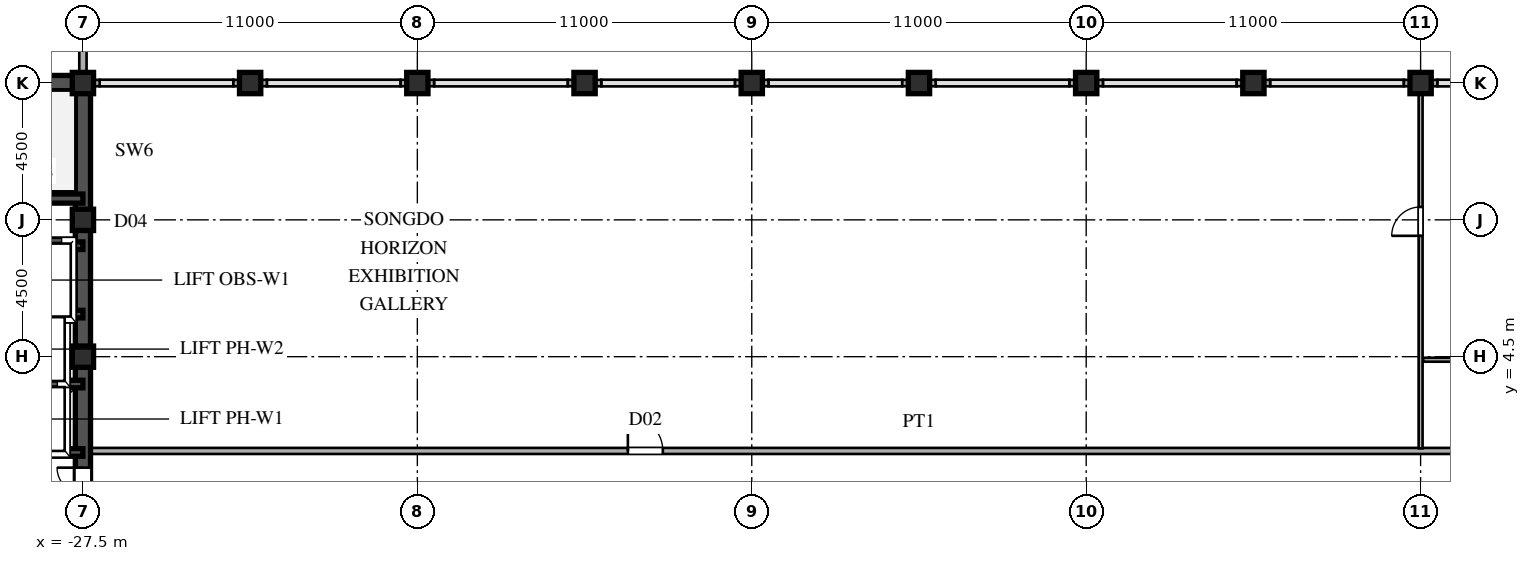
"""IFC4 building model, lengths in metres.
Left out: names, types, materials, properties, quantities, classifications, styles, units other than length and angle.
Written with IfcOpenShell. Run it as: python <this file> out.ifc"""

import sys

from ifc_helpers import new_model, si_unit, direction, frame, frame_2d, origin, origin_2d, place, context, subcontext, project, spatial, rectangle, hollow_rectangle, extrude, source, transform, mapped, element, fill, save


model = new_model("IFC4")
c1 = context("Model", 3, precision=1e-05, world=origin(), true_north=direction((0.0, 1.0)))
c2 = subcontext(c1, "Body", "Model", "MODEL_VIEW")
j1 = project(units=[si_unit("LENGTHUNIT", "METRE"), si_unit("PLANEANGLEUNIT", "RADIAN")], contexts=[c1])
p1 = place(None, origin())
s1 = spatial("IfcSite", under=j1, at=p1, CompositionType="ELEMENT")
p2 = place(p1, origin())
s2 = spatial("IfcBuilding", under=s1, at=p2, CompositionType="ELEMENT")
p3 = place(p2, frame((0.0, 0.0, 269.4)))
s3 = spatial("IfcBuildingStorey", under=s2, at=p3, CompositionType="ELEMENT", Elevation=269.4)
m1 = source(origin(), c2, "Body", "SweptSolid", [
    extrude(hollow_rectangle(XDim=0.7, YDim=0.7, WallThickness=0.03, at=origin_2d()), origin(), (0.0, 0.0, 1.0), 4.8),
])
for number, where, z_axis, x_axis in (
    (1, (-27.5, 4.5, 0.0), (0.0, 0.0, 1.0), (1.0, 0.0, 0.0)),
    (2, (-27.5, 9.0, 0.0), (0.0, 0.0, 1.0), (1.0, 0.0, 0.0)),
    (3, (-27.5, 13.5, 0.0), (0.0, 0.0, 1.0), (1.0, 0.0, 0.0)),
    (4, (-22.0, 13.5, 0.0), (0.0, 0.0, 1.0), (1.0, 0.0, 0.0)),
    (5, (-16.5, 13.5, 0.0), (0.0, 0.0, 1.0), (1.0, 0.0, 0.0)),
    (6, (-11.0, 13.5, 0.0), (0.0, 0.0, 1.0), (1.0, 0.0, 0.0)),
    (7, (-5.5, 13.5, 0.0), (0.0, 0.0, 1.0), (1.0, 0.0, 0.0)),
    (8, (0.0, 13.5, 0.0), (0.0, 0.0, 1.0), (1.0, 0.0, 0.0)),
    (9, (5.5, 13.5, 0.0), (0.0, 0.0, 1.0), (1.0, 0.0, 0.0)),
    (10, (11.0, 13.5, 0.0), (0.0, 0.0, 1.0), (1.0, 0.0, 0.0)),
    (11, (16.5, 13.5, 0.0), (0.0, 0.0, 1.0), (1.0, 0.0, 0.0)),
):
    element("IfcColumn", number, at=place(p3, frame(where, z_axis=z_axis, x_axis=x_axis)), inside=s3, PredefinedType="COLUMN", context=c2, shape_type="MappedRepresentation", body=[
        mapped(m1, transform((0.0, 0.0, 0.0), scale=1.0)),
    ])
p4 = place(p3, frame((-27.5, 13.755, 0.0), z_axis=(0.0, 0.0, 1.0), x_axis=(0.0, 1.0, 0.0)))
e12 = element("IfcWall", 12, at=p4, inside=s3, PredefinedType="SOLIDWALL", context=c2, shape_type="SweptSolid", body=[
    extrude(rectangle(XDim=0.62, YDim=0.24, at=frame_2d((0.31, 0.0))), origin(), (0.0, 0.0, 1.0), 4.04),
])
p5 = place(p3, frame((-27.5, 14.375, 0.0), z_axis=(0.0, 0.0, 1.0), x_axis=(0.0, 1.0, 0.0)))
e13 = element("IfcWall", 13, at=p5, inside=s3, PredefinedType="SOLIDWALL", context=c2, shape_type="SweptSolid", body=[
    extrude(rectangle(XDim=1.605, YDim=0.24, at=frame_2d((0.803, 0.0))), origin(), (0.0, 0.0, 1.0), 4.54),
])
p6 = place(p3, frame((-27.49, 13.5, 0.0), z_axis=(0.0, 0.0, 1.0), x_axis=(1.0, 0.0, 0.0)))
e14 = element("IfcWall", 14, at=p6, inside=s3, PredefinedType="SOLIDWALL", context=c2, shape_type="SweptSolid", body=[
    extrude(rectangle(XDim=0.54, YDim=0.21, at=frame_2d((0.27, 0.0))), origin(), (0.0, 0.0, 1.0), 4.04),
])
for number, where, z_axis, x_axis in (
    (15, (-22.55, 13.5, 0.0), (0.0, 0.0, 1.0), (1.0, 0.0, 0.0)),
    (16, (-17.05, 13.5, 0.0), (0.0, 0.0, 1.0), (1.0, 0.0, 0.0)),
    (17, (-11.55, 13.5, 0.0), (0.0, 0.0, 1.0), (1.0, 0.0, 0.0)),
    (18, (-6.05, 13.5, 0.0), (0.0, 0.0, 1.0), (1.0, 0.0, 0.0)),
    (19, (-0.55, 13.5, 0.0), (0.0, 0.0, 1.0), (1.0, 0.0, 0.0)),
    (20, (4.95, 13.5, 0.0), (0.0, 0.0, 1.0), (1.0, 0.0, 0.0)),
    (21, (10.45, 13.5, 0.0), (0.0, 0.0, 1.0), (1.0, 0.0, 0.0)),
    (22, (15.95, 13.5, 0.0), (0.0, 0.0, 1.0), (1.0, 0.0, 0.0)),
):
    element("IfcWall", number, at=place(p3, frame(where, z_axis=z_axis, x_axis=x_axis)), inside=s3, PredefinedType="SOLIDWALL", context=c2, shape_type="SweptSolid", body=[
        extrude(rectangle(XDim=1.1, YDim=0.21, at=frame_2d((0.55, 0.0))), origin(), (0.0, 0.0, 1.0), 4.04),
    ])
p7 = place(p3, frame((-27.5, 1.3, 0.0), z_axis=(0.0, 0.0, 1.0), x_axis=(0.0, 1.0, 0.0)))
e23 = element("IfcWall", 23, at=p7, inside=s3, PredefinedType="SHEAR", context=c2, shape_type="SweptSolid", body=[
    extrude(rectangle(XDim=12.2, YDim=0.5, at=frame_2d((6.1, 0.0))), origin(), (0.0, 0.0, 1.0), 4.54),
])
p8 = place(p3, frame((-27.5, -1.3, 0.0), z_axis=(0.0, 0.0, 1.0), x_axis=(0.0, 1.0, 0.0)))
e24 = element("IfcWall", 24, at=p8, inside=s3, PredefinedType="SHEAR", context=c2, shape_type="SweptSolid", body=[
    extrude(rectangle(XDim=2.6, YDim=0.5, at=frame_2d((1.3, 0.0))), origin(), (0.0, 0.0, 1.0), 4.54),
])
p9 = place(p8, frame((0.45, 0.0, 0.0)))
e25 = element("IfcOpeningElement", 25, at=p9, cuts=e24, PredefinedType="OPENING", context=c2, shape_type="SweptSolid", body=[
    extrude(rectangle(XDim=1.7, YDim=2.35, at=frame_2d((0.85, 1.175))), frame((0.0, 0.26, 0.0), z_axis=(0.0, -1.0, 0.0), x_axis=(1.0, 0.0, 0.0)), (0.0, 0.0, 1.0), 0.52),
])
p10 = place(p3, frame((-36.5, 13.5, 0.0), z_axis=(0.0, 0.0, 1.0), x_axis=(1.0, 0.0, 0.0)))
e26 = element("IfcWall", 26, at=p10, inside=s3, PredefinedType="SHEAR", context=c2, shape_type="SweptSolid", body=[
    extrude(rectangle(XDim=9.0, YDim=0.5, at=frame_2d((4.5, 0.0))), origin(), (0.0, 0.0, 1.0), 4.54),
])
p11 = place(p3, frame((-36.5, 9.7, 0.0), z_axis=(0.0, 0.0, 1.0), x_axis=(1.0, 0.0, 0.0)))
e27 = element("IfcWall", 27, at=p11, inside=s3, PredefinedType="SHEAR", context=c2, shape_type="SweptSolid", body=[
    extrude(rectangle(XDim=9.0, YDim=0.3, at=frame_2d((4.5, 0.0))), origin(), (0.0, 0.0, 1.0), 4.54),
])
p12 = place(p11, frame((0.6, 0.0, 0.0)))
e28 = element("IfcOpeningElement", 28, at=p12, cuts=e27, PredefinedType="OPENING", context=c2, shape_type="SweptSolid", body=[
    extrude(rectangle(XDim=1.1, YDim=2.2, at=frame_2d((0.55, 1.1))), frame((0.0, 0.16, 0.0), z_axis=(0.0, -1.0, 0.0), x_axis=(1.0, 0.0, 0.0)), (0.0, 0.0, 1.0), 0.32),
])
for number, where, z_axis, x_axis in (
    (29, (-30.3, 1.35, 0.0), (0.0, 0.0, 1.0), (1.0, 0.0, 0.0)),
    (30, (-30.3, 3.6, 0.0), (0.0, 0.0, 1.0), (1.0, 0.0, 0.0)),
    (31, (-30.3, 5.9, 0.0), (0.0, 0.0, 1.0), (1.0, 0.0, 0.0)),
    (32, (-30.3, 8.15, 0.0), (0.0, 0.0, 1.0), (1.0, 0.0, 0.0)),
):
    element("IfcWall", number, at=place(p3, frame(where, z_axis=z_axis, x_axis=x_axis)), inside=s3, PredefinedType="SHEAR", context=c2, shape_type="SweptSolid", body=[
        extrude(rectangle(XDim=2.8, YDim=0.25, at=frame_2d((1.4, 0.0))), origin(), (0.0, 0.0, 1.0), 4.54),
    ])
p13 = place(p3, frame((-27.245, 1.4, 0.0), z_axis=(0.0, 0.0, 1.0), x_axis=(1.0, 0.0, 0.0)))
e33 = element("IfcWall", 33, at=p13, inside=s3, PredefinedType="PARTITIONING", context=c2, shape_type="SweptSolid", body=[
    extrude(rectangle(XDim=54.49, YDim=0.2, at=frame_2d((27.245, 0.0))), origin(), (0.0, 0.0, 1.0), 4.54),
])
p14 = place(p13, frame((17.67, 0.0, 0.0)))
e34 = element("IfcOpeningElement", 34, at=p14, cuts=e33, PredefinedType="OPENING", context=c2, shape_type="SweptSolid", body=[
    extrude(rectangle(XDim=1.15, YDim=2.2, at=frame_2d((0.575, 1.1))), frame((0.0, 0.11, 0.0), z_axis=(0.0, -1.0, 0.0), x_axis=(1.0, 0.0, 0.0)), (0.0, 0.0, 1.0), 0.22),
])
p15 = place(p13, frame((46.055, 0.0, 0.0)))
e35 = element("IfcOpeningElement", 35, at=p15, cuts=e33, PredefinedType="OPENING", context=c2, shape_type="SweptSolid", body=[
    extrude(rectangle(XDim=0.88, YDim=2.1, at=frame_2d((0.44, 1.05))), frame((0.0, 0.11, 0.0), z_axis=(0.0, -1.0, 0.0), x_axis=(1.0, 0.0, 0.0)), (0.0, 0.0, 1.0), 0.22),
])
p16 = place(p13, frame((51.405, 0.0, 0.0)))
e36 = element("IfcOpeningElement", 36, at=p16, cuts=e33, PredefinedType="OPENING", context=c2, shape_type="SweptSolid", body=[
    extrude(rectangle(XDim=0.88, YDim=2.1, at=frame_2d((0.44, 1.05))), frame((0.0, 0.11, 0.0), z_axis=(0.0, -1.0, 0.0), x_axis=(1.0, 0.0, 0.0)), (0.0, 0.0, 1.0), 0.22),
])
p17 = place(p3, frame((16.585, 4.4, 0.0), z_axis=(0.0, 0.0, 1.0), x_axis=(1.0, 0.0, 0.0)))
e37 = element("IfcWall", 37, at=p17, inside=s3, PredefinedType="PARTITIONING", context=c2, shape_type="SweptSolid", body=[
    extrude(rectangle(XDim=10.66, YDim=0.13, at=frame_2d((5.33, 0.0))), origin(), (0.0, 0.0, 1.0), 4.54),
])
p18 = place(p3, frame((16.5, 1.485, 0.0), z_axis=(0.0, 0.0, 1.0), x_axis=(0.0, 1.0, 0.0)))
e38 = element("IfcWall", 38, at=p18, inside=s3, PredefinedType="PARTITIONING", context=c2, shape_type="SweptSolid", body=[
    extrude(rectangle(XDim=11.905, YDim=0.13, at=frame_2d((5.952, 0.0))), origin(), (0.0, 0.0, 1.0), 3.24),
])
p19 = place(p18, frame((6.99, 0.0, 0.0)))
e39 = element("IfcOpeningElement", 39, at=p19, cuts=e38, PredefinedType="OPENING", context=c2, shape_type="SweptSolid", body=[
    extrude(rectangle(XDim=0.95, YDim=2.15, at=frame_2d((0.475, 1.075))), frame((0.0, 0.075, 0.0), z_axis=(0.0, -1.0, 0.0), x_axis=(1.0, 0.0, 0.0)), (0.0, 0.0, 1.0), 0.15),
])
m2 = source(origin(), c2, "Body", "SweptSolid", [
    extrude(rectangle(XDim=1.7, YDim=2.35, at=frame_2d((0.85, 1.175))), frame((0.0, 0.025, 0.0), z_axis=(0.0, -1.0, 0.0), x_axis=(1.0, 0.0, 0.0)), (0.0, 0.0, 1.0), 0.05),
])
p20 = place(p9, origin())
e40 = element("IfcDoor", 40, at=p20, inside=s3, OperationType="DOUBLE_SWING_LEFT", PredefinedType="DOOR", context=c2, shape_type="MappedRepresentation", body=[
    mapped(m2, transform((0.0, 0.0, 0.0), scale=1.0)),
])
fill(e25, e40)
m3 = source(origin(), c2, "Body", "SweptSolid", [
    extrude(rectangle(XDim=1.15, YDim=2.2, at=frame_2d((0.575, 1.1))), frame((0.0, 0.025, 0.0), z_axis=(0.0, -1.0, 0.0), x_axis=(1.0, 0.0, 0.0)), (0.0, 0.0, 1.0), 0.05),
])
p21 = place(p14, origin())
e41 = element("IfcDoor", 41, at=p21, inside=s3, OperationType="SINGLE_SWING_LEFT", PredefinedType="DOOR", context=c2, shape_type="MappedRepresentation", body=[
    mapped(m3, transform((0.0, 0.0, 0.0), scale=1.0)),
])
fill(e34, e41)
m4 = source(origin(), c2, "Body", "SweptSolid", [
    extrude(rectangle(XDim=0.95, YDim=2.15, at=frame_2d((0.475, 1.075))), frame((0.0, 0.025, 0.0), z_axis=(0.0, -1.0, 0.0), x_axis=(1.0, 0.0, 0.0)), (0.0, 0.0, 1.0), 0.05),
])
p22 = place(p19, origin())
e42 = element("IfcDoor", 42, at=p22, inside=s3, OperationType="SINGLE_SWING_LEFT", PredefinedType="DOOR", context=c2, shape_type="MappedRepresentation", body=[
    mapped(m4, transform((0.0, 0.0, 0.0), scale=1.0)),
])
fill(e39, e42)
save(model, sys.argv[1])
